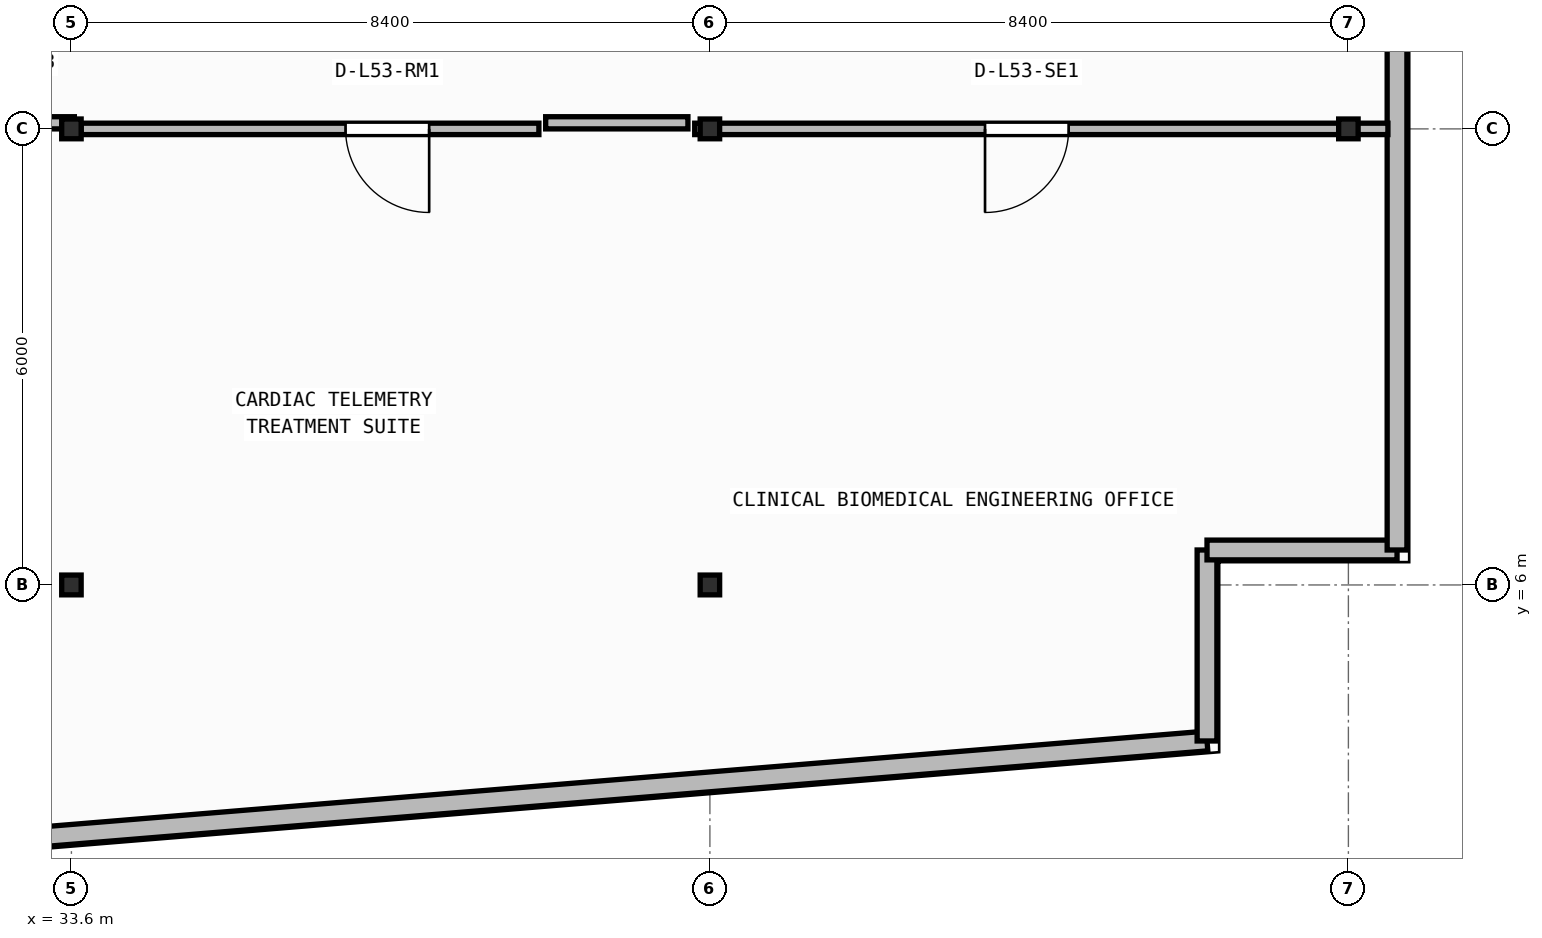
"""IFC4 building model, lengths in metres.
Left out: names, types, materials, properties, quantities, classifications, styles, units other than length and angle.
Written with IfcOpenShell. Run it as: python <this file> out.ifc"""

import sys

from ifc_helpers import new_model, si_unit, direction, frame, frame_2d, origin, origin_2d, place, context, subcontext, project, spatial, rectangle, i_section, extrude, element, fill, save


model = new_model("IFC4")
c1 = context("Model", 3, precision=1e-05, world=origin(), true_north=direction((0.0, 1.0)))
c2 = subcontext(c1, "Body", "Model", "MODEL_VIEW")
j1 = project(units=[si_unit("LENGTHUNIT", "METRE"), si_unit("PLANEANGLEUNIT", "RADIAN")], contexts=[c1])
p1 = place(None, origin())
s1 = spatial("IfcSite", under=j1, at=p1, CompositionType="ELEMENT")
p2 = place(p1, origin())
s2 = spatial("IfcBuilding", under=s1, at=p2, CompositionType="ELEMENT")
p3 = place(p2, frame((0.0, 0.0, 215.8)))
s3 = spatial("IfcBuildingStorey", under=s2, at=p3, CompositionType="ELEMENT", Elevation=215.8)
for number, where, z_axis, x_axis in (
    (1, (33.6, 6.0, 0.0), (0.0, 0.0, 1.0), (1.0, 0.0, 0.0)),
    (2, (42.0, 6.0, 0.0), (0.0, 0.0, 1.0), (1.0, 0.0, 0.0)),
    (3, (33.6, 12.0, 0.0), (0.0, 0.0, 1.0), (1.0, 0.0, 0.0)),
    (4, (42.0, 12.0, 0.0), (0.0, 0.0, 1.0), (1.0, 0.0, 0.0)),
    (5, (50.4, 12.0, 0.0), (0.0, 0.0, 1.0), (1.0, 0.0, 0.0)),
):
    element("IfcColumn", number, at=place(p3, frame(where, z_axis=z_axis, x_axis=x_axis)), inside=s3, PredefinedType="COLUMN", context=c2, shape_type="SweptSolid", body=[
        extrude(i_section(OverallWidth=0.256, OverallDepth=0.26, WebThickness=0.01, FlangeThickness=0.017, FilletRadius=0.013, at=origin_2d()), origin(), (0.0, 0.0, 1.0), 3.95),
    ])
p4 = place(p3, frame((2.66, 0.174, 0.0), z_axis=(0.0, 0.0, 1.0), x_axis=(0.996634028439, 0.081979347142, 0.0)))
e6 = element("IfcWall", 6, at=p4, inside=s3, PredefinedType="STANDARD", context=c2, shape_type="SweptSolid", body=[
    extrude(rectangle(XDim=46.035, YDim=0.26, at=frame_2d((23.018, 0.0))), origin(), (0.0, 0.0, 1.0), 3.71),
])
p5 = place(p4, frame((21.817, 0.0, 0.9)))
e7 = element("IfcOpeningElement", 7, at=p5, cuts=e6, PredefinedType="OPENING", context=c2, shape_type="SweptSolid", body=[
    extrude(rectangle(XDim=2.4, YDim=1.65, at=frame_2d((1.2, 0.825))), frame((0.0, 0.14, 0.0), z_axis=(0.0, -1.0, 0.0), x_axis=(1.0, 0.0, 0.0)), (0.0, 0.0, 1.0), 0.28),
])
p6 = place(p3, frame((48.54, 3.948, 0.0), z_axis=(0.0, 0.0, 1.0), x_axis=(0.0, 1.0, 0.0)))
e8 = element("IfcWall", 8, at=p6, inside=s3, PredefinedType="STANDARD", context=c2, shape_type="SweptSolid", body=[
    extrude(rectangle(XDim=2.512, YDim=0.26, at=frame_2d((1.256, 0.0))), origin(), (0.0, 0.0, 1.0), 3.71),
])
p7 = place(p3, frame((48.54, 6.46, 0.0), z_axis=(0.0, 0.0, 1.0), x_axis=(1.0, 0.0, 0.0)))
e9 = element("IfcWall", 9, at=p7, inside=s3, PredefinedType="STANDARD", context=c2, shape_type="SweptSolid", body=[
    extrude(rectangle(XDim=2.5, YDim=0.26, at=frame_2d((1.25, 0.0))), origin(), (0.0, 0.0, 1.0), 3.71),
])
p8 = place(p3, frame((51.04, 6.46, 0.0), z_axis=(0.0, 0.0, 1.0), x_axis=(0.0, 1.0, 0.0)))
e10 = element("IfcWall", 10, at=p8, inside=s3, PredefinedType="STANDARD", context=c2, shape_type="SweptSolid", body=[
    extrude(rectangle(XDim=22.68, YDim=0.26, at=frame_2d((11.34, 0.0))), origin(), (0.0, 0.0, 1.0), 3.71),
])
p9 = place(p8, frame((10.69, 0.0, 0.0)))
e11 = element("IfcOpeningElement", 11, at=p9, cuts=e10, PredefinedType="OPENING", context=c2, shape_type="SweptSolid", body=[
    extrude(rectangle(XDim=1.3, YDim=2.15, at=frame_2d((0.65, 1.075))), frame((0.0, 0.14, 0.0), z_axis=(0.0, -1.0, 0.0), x_axis=(1.0, 0.0, 0.0)), (0.0, 0.0, 1.0), 0.28),
])
p10 = place(p3, frame((39.75, 12.0, 0.0), z_axis=(0.0, 0.0, 1.0), x_axis=(-1.0, 0.0, 0.0)))
e12 = element("IfcWall", 12, at=p10, inside=s3, PredefinedType="PARTITIONING", context=c2, shape_type="SweptSolid", body=[
    extrude(rectangle(XDim=6.022, YDim=0.15, at=frame_2d((3.011, 0.0))), origin(), (0.0, 0.0, 1.0), 3.152),
])
p11 = place(p10, frame((1.444, 0.0, 0.0)))
e13 = element("IfcOpeningElement", 13, at=p11, cuts=e12, PredefinedType="OPENING", context=c2, shape_type="SweptSolid", body=[
    extrude(rectangle(XDim=1.1, YDim=2.1, at=frame_2d((0.55, 1.05))), frame((0.0, 0.085, 0.0), z_axis=(0.0, -1.0, 0.0), x_axis=(1.0, 0.0, 0.0)), (0.0, 0.0, 1.0), 0.17),
])
p12 = place(p3, frame((50.92, 12.0, 0.0), z_axis=(0.0, 0.0, 1.0), x_axis=(-1.0, 0.0, 0.0)))
e14 = element("IfcWall", 14, at=p12, inside=s3, PredefinedType="PARTITIONING", context=c2, shape_type="SweptSolid", body=[
    extrude(rectangle(XDim=9.12, YDim=0.15, at=frame_2d((4.56, 0.0))), origin(), (0.0, 0.0, 1.0), 3.152),
])
p13 = place(p12, frame((4.2, 0.0, 0.0)))
e15 = element("IfcOpeningElement", 15, at=p13, cuts=e14, PredefinedType="OPENING", context=c2, shape_type="SweptSolid", body=[
    extrude(rectangle(XDim=1.1, YDim=2.1, at=frame_2d((0.55, 1.05))), frame((0.0, 0.085, 0.0), z_axis=(0.0, -1.0, 0.0), x_axis=(1.0, 0.0, 0.0)), (0.0, 0.0, 1.0), 0.17),
])
p14 = place(p3, frame((31.439, 12.08, 0.0), z_axis=(0.0, 0.0, 1.0), x_axis=(1.0, 0.0, 0.0)))
e16 = element("IfcWall", 16, at=p14, inside=s3, PredefinedType="PARTITIONING", context=c2, shape_type="SweptSolid", body=[
    extrude(rectangle(XDim=2.199, YDim=0.16, at=frame_2d((1.1, 0.0))), origin(), (0.0, 0.0, 1.0), 3.152),
])
p15 = place(p3, frame((39.839, 12.08, 0.0), z_axis=(0.0, 0.0, 1.0), x_axis=(1.0, 0.0, 0.0)))
e17 = element("IfcWall", 17, at=p15, inside=s3, PredefinedType="PARTITIONING", context=c2, shape_type="SweptSolid", body=[
    extrude(rectangle(XDim=1.871, YDim=0.16, at=frame_2d((0.936, 0.0))), origin(), (0.0, 0.0, 1.0), 3.152),
])
p16 = place(p11, origin())
e18 = element("IfcDoor", 18, at=p16, inside=s3, OperationType="SINGLE_SWING_LEFT", PredefinedType="DOOR", context=c2, shape_type="SweptSolid", body=[
    extrude(rectangle(XDim=1.1, YDim=2.1, at=frame_2d((0.55, 1.05))), frame((0.0, 0.025, 0.0), z_axis=(0.0, -1.0, 0.0), x_axis=(1.0, 0.0, 0.0)), (0.0, 0.0, 1.0), 0.05),
])
fill(e13, e18)
p17 = place(p13, origin())
e19 = element("IfcDoor", 19, at=p17, inside=s3, OperationType="SINGLE_SWING_RIGHT", PredefinedType="DOOR", context=c2, shape_type="SweptSolid", body=[
    extrude(rectangle(XDim=1.1, YDim=2.1, at=frame_2d((0.55, 1.05))), frame((0.0, 0.025, 0.0), z_axis=(0.0, -1.0, 0.0), x_axis=(1.0, 0.0, 0.0)), (0.0, 0.0, 1.0), 0.05),
])
fill(e15, e19)
save(model, sys.argv[1])
